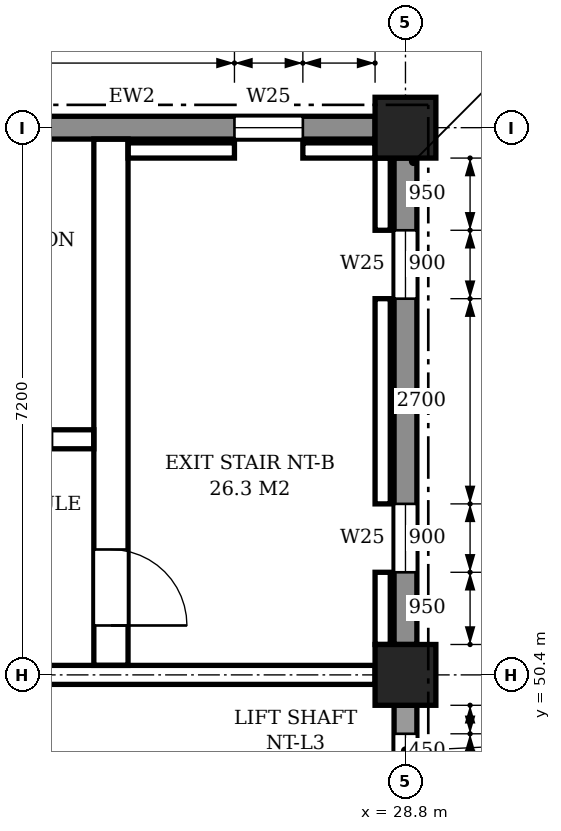
"""IFC4 building model, lengths in metres.
Left out: names, types, materials, properties, quantities, classifications, styles, units other than length and angle.
Written with IfcOpenShell. Run it as: python <this file> out.ifc"""

import sys

from ifc_helpers import new_model, si_unit, direction, frame, frame_2d, origin, origin_2d, place, context, subcontext, project, spatial, polyline, rectangle, outline, extrude, element, fill, save


model = new_model("IFC4")
c1 = context("Model", 3, precision=1e-05, world=origin(), true_north=direction((0.0, 1.0)))
c2 = subcontext(c1, "Body", "Model", "MODEL_VIEW")
j1 = project(units=[si_unit("LENGTHUNIT", "METRE"), si_unit("PLANEANGLEUNIT", "RADIAN")], contexts=[c1])
p1 = place(None, origin())
s1 = spatial("IfcSite", under=j1, at=p1, CompositionType="ELEMENT")
p2 = place(p1, origin())
s2 = spatial("IfcBuilding", under=s1, at=p2, CompositionType="ELEMENT")
p3 = place(p2, frame((0.0, 0.0, 49.8)))
s3 = spatial("IfcBuildingStorey", under=s2, at=p3, CompositionType="ELEMENT", Elevation=49.8)
for number, where, z_axis, x_axis in (
    (1, (28.8, 50.4, 0.0), (0.0, 0.0, 1.0), (1.0, 0.0, 0.0)),
    (2, (28.8, 57.6, 0.0), (0.0, 0.0, 1.0), (1.0, 0.0, 0.0)),
):
    element("IfcColumn", number, at=place(p3, frame(where, z_axis=z_axis, x_axis=x_axis)), inside=s3, PredefinedType="COLUMN", context=c2, shape_type="SweptSolid", body=[
        extrude(rectangle(XDim=0.8, YDim=0.8, at=origin_2d()), origin(), (0.0, 0.0, 1.0), 4.5),
    ])
p4 = place(p3, frame((28.4, 57.6, 0.0), z_axis=(0.0, 0.0, 1.0), x_axis=(-1.0, 0.0, 0.0)))
e3 = element("IfcWall", 3, at=p4, inside=s3, PredefinedType="STANDARD", context=c2, shape_type="SweptSolid", body=[
    extrude(rectangle(XDim=6.4, YDim=0.3, at=frame_2d((3.2, 0.0))), origin(), (0.0, 0.0, 1.0), 3.6),
])
p5 = place(p4, frame((0.95, 0.0, 0.9)))
e4 = element("IfcOpeningElement", 4, at=p5, cuts=e3, PredefinedType="OPENING", context=c2, shape_type="SweptSolid", body=[
    extrude(outline(polyline([(0.0, 0.0), (0.9, 0.0), (0.9, 2.15), (0.45, 2.6), (0.0, 2.15), (0.0, 0.0)])), frame((0.0, 0.16, 0.0), z_axis=(0.0, -1.0, 0.0), x_axis=(1.0, 0.0, 0.0)), (0.0, 0.0, 1.0), 0.32),
])
p6 = place(p3, frame((28.8, 43.6, 0.0), z_axis=(0.0, 0.0, 1.0), x_axis=(0.0, 1.0, 0.0)))
e5 = element("IfcWall", 5, at=p6, inside=s3, PredefinedType="STANDARD", context=c2, shape_type="SweptSolid", body=[
    extrude(rectangle(XDim=6.4, YDim=0.3, at=frame_2d((3.2, 0.0))), origin(), (0.0, 0.0, 1.0), 3.6),
])
p7 = place(p6, frame((3.975, 0.0, 0.9)))
e6 = element("IfcOpeningElement", 6, at=p7, cuts=e5, PredefinedType="OPENING", context=c2, shape_type="SweptSolid", body=[
    extrude(outline(polyline([(0.0, 0.0), (0.45, 0.0), (0.45, 2.35), (0.225, 2.6), (0.0, 2.35), (0.0, 0.0)])), frame((0.0, 0.16, 0.0), z_axis=(0.0, -1.0, 0.0), x_axis=(1.0, 0.0, 0.0)), (0.0, 0.0, 1.0), 0.32),
])
p8 = place(p6, frame((4.775, 0.0, 0.9)))
e7 = element("IfcOpeningElement", 7, at=p8, cuts=e5, PredefinedType="OPENING", context=c2, shape_type="SweptSolid", body=[
    extrude(outline(polyline([(0.0, 0.0), (0.45, 0.0), (0.45, 2.35), (0.225, 2.6), (0.0, 2.35), (0.0, 0.0)])), frame((0.0, 0.16, 0.0), z_axis=(0.0, -1.0, 0.0), x_axis=(1.0, 0.0, 0.0)), (0.0, 0.0, 1.0), 0.32),
])
p9 = place(p6, frame((5.575, 0.0, 0.9)))
e8 = element("IfcOpeningElement", 8, at=p9, cuts=e5, PredefinedType="OPENING", context=c2, shape_type="SweptSolid", body=[
    extrude(outline(polyline([(0.0, 0.0), (0.45, 0.0), (0.45, 2.35), (0.225, 2.6), (0.0, 2.35), (0.0, 0.0)])), frame((0.0, 0.16, 0.0), z_axis=(0.0, -1.0, 0.0), x_axis=(1.0, 0.0, 0.0)), (0.0, 0.0, 1.0), 0.32),
])
p10 = place(p3, frame((28.8, 50.8, 0.0), z_axis=(0.0, 0.0, 1.0), x_axis=(0.0, 1.0, 0.0)))
e9 = element("IfcWall", 9, at=p10, inside=s3, PredefinedType="STANDARD", context=c2, shape_type="SweptSolid", body=[
    extrude(rectangle(XDim=6.4, YDim=0.3, at=frame_2d((3.2, 0.0))), origin(), (0.0, 0.0, 1.0), 3.6),
])
p11 = place(p10, frame((0.95, 0.0, 0.9)))
e10 = element("IfcOpeningElement", 10, at=p11, cuts=e9, PredefinedType="OPENING", context=c2, shape_type="SweptSolid", body=[
    extrude(outline(polyline([(0.0, 0.0), (0.9, 0.0), (0.9, 2.15), (0.45, 2.6), (0.0, 2.15), (0.0, 0.0)])), frame((0.0, 0.16, 0.0), z_axis=(0.0, -1.0, 0.0), x_axis=(1.0, 0.0, 0.0)), (0.0, 0.0, 1.0), 0.32),
])
p12 = place(p10, frame((4.55, 0.0, 0.9)))
e11 = element("IfcOpeningElement", 11, at=p12, cuts=e9, PredefinedType="OPENING", context=c2, shape_type="SweptSolid", body=[
    extrude(outline(polyline([(0.0, 0.0), (0.9, 0.0), (0.9, 2.15), (0.45, 2.6), (0.0, 2.15), (0.0, 0.0)])), frame((0.0, 0.16, 0.0), z_axis=(0.0, -1.0, 0.0), x_axis=(1.0, 0.0, 0.0)), (0.0, 0.0, 1.0), 0.32),
])
p13 = place(p3, frame((22.0, 50.4, 0.0), z_axis=(0.0, 0.0, 1.0), x_axis=(1.0, 0.0, 0.0)))
e12 = element("IfcWall", 12, at=p13, inside=s3, PredefinedType="SHEAR", context=c2, shape_type="SweptSolid", body=[
    extrude(rectangle(XDim=6.4, YDim=0.25, at=frame_2d((3.2, 0.0))), origin(), (0.0, 0.0, 1.0), 3.55),
])
p14 = place(p13, frame((0.45, 0.0, 0.0)))
e13 = element("IfcOpeningElement", 13, at=p14, cuts=e12, PredefinedType="OPENING", context=c2, shape_type="SweptSolid", body=[
    extrude(rectangle(XDim=1.1, YDim=2.1, at=frame_2d((0.55, 1.05))), frame((0.0, 0.135, 0.0), z_axis=(0.0, -1.0, 0.0), x_axis=(1.0, 0.0, 0.0)), (0.0, 0.0, 1.0), 0.27),
])
p15 = place(p3, frame((28.5, 50.8, -0.25), z_axis=(0.0, 0.0, 1.0), x_axis=(0.0, 1.0, 0.0)))
e14 = element("IfcWall", 14, at=p15, inside=s3, PredefinedType="SHEAR", context=c2, shape_type="SweptSolid", body=[
    extrude(rectangle(XDim=0.95, YDim=0.2, at=frame_2d((0.475, 0.0))), origin(), (0.0, 0.0, 1.0), 4.45),
])
p16 = place(p3, frame((28.5, 52.65, -0.25), z_axis=(0.0, 0.0, 1.0), x_axis=(0.0, 1.0, 0.0)))
e15 = element("IfcWall", 15, at=p16, inside=s3, PredefinedType="SHEAR", context=c2, shape_type="SweptSolid", body=[
    extrude(rectangle(XDim=2.7, YDim=0.2, at=frame_2d((1.35, 0.0))), origin(), (0.0, 0.0, 1.0), 4.45),
])
p17 = place(p3, frame((28.5, 56.25, -0.25), z_axis=(0.0, 0.0, 1.0), x_axis=(0.0, 1.0, 0.0)))
e16 = element("IfcWall", 16, at=p17, inside=s3, PredefinedType="SHEAR", context=c2, shape_type="SweptSolid", body=[
    extrude(rectangle(XDim=0.95, YDim=0.2, at=frame_2d((0.475, 0.0))), origin(), (0.0, 0.0, 1.0), 4.45),
])
p18 = place(p3, frame((25.15, 57.3, -0.25), z_axis=(0.0, 0.0, 1.0), x_axis=(1.0, 0.0, 0.0)))
e17 = element("IfcWall", 17, at=p18, inside=s3, PredefinedType="SHEAR", context=c2, shape_type="SweptSolid", body=[
    extrude(rectangle(XDim=1.4, YDim=0.2, at=frame_2d((0.7, 0.0))), origin(), (0.0, 0.0, 1.0), 4.45),
])
p19 = place(p3, frame((27.45, 57.3, -0.25), z_axis=(0.0, 0.0, 1.0), x_axis=(1.0, 0.0, 0.0)))
e18 = element("IfcWall", 18, at=p19, inside=s3, PredefinedType="SHEAR", context=c2, shape_type="SweptSolid", body=[
    extrude(rectangle(XDim=0.95, YDim=0.2, at=frame_2d((0.475, 0.0))), origin(), (0.0, 0.0, 1.0), 4.45),
])
p20 = place(p3, frame((24.925, 50.525, 0.0), z_axis=(0.0, 0.0, 1.0), x_axis=(0.0, 1.0, 0.0)))
e19 = element("IfcWall", 19, at=p20, inside=s3, PredefinedType="SHEAR", context=c2, shape_type="SweptSolid", body=[
    extrude(rectangle(XDim=6.925, YDim=0.45, at=frame_2d((3.462, 0.0))), origin(), (0.0, 0.0, 1.0), 4.2),
])
p21 = place(p20, frame((0.525, 0.0, 0.0)))
e20 = element("IfcOpeningElement", 20, at=p21, cuts=e19, PredefinedType="OPENING", context=c2, shape_type="SweptSolid", body=[
    extrude(rectangle(XDim=1.0, YDim=2.1, at=frame_2d((0.5, 1.05))), frame((0.0, 0.235, 0.0), z_axis=(0.0, -1.0, 0.0), x_axis=(1.0, 0.0, 0.0)), (0.0, 0.0, 1.0), 0.47),
])
p22 = place(p3, frame((21.725, 53.5, 0.0), z_axis=(0.0, 0.0, 1.0), x_axis=(1.0, 0.0, 0.0)))
e21 = element("IfcWall", 21, at=p22, inside=s3, PredefinedType="SHEAR", context=c2, shape_type="SweptSolid", body=[
    extrude(rectangle(XDim=2.975, YDim=0.25, at=frame_2d((1.487, 0.0))), origin(), (0.0, 0.0, 1.0), 4.2),
])
p23 = place(p22, frame((1.525, 0.0, 0.0)))
e22 = element("IfcOpeningElement", 22, at=p23, cuts=e21, PredefinedType="OPENING", context=c2, shape_type="SweptSolid", body=[
    extrude(rectangle(XDim=0.9, YDim=2.1, at=frame_2d((0.45, 1.05))), frame((0.0, 0.135, 0.0), z_axis=(0.0, -1.0, 0.0), x_axis=(1.0, 0.0, 0.0)), (0.0, 0.0, 1.0), 0.27),
])
p24 = place(p9, origin())
e23 = element("IfcWindow", 23, at=p24, inside=s3, PartitioningType="SINGLE_PANEL", PredefinedType="WINDOW", context=c2, shape_type="SweptSolid", body=[
    extrude(outline(polyline([(0.0, 0.0), (0.45, 0.0), (0.45, 2.35), (0.225, 2.6), (0.0, 2.35), (0.0, 0.0)])), frame((0.0, 0.03, 0.0), z_axis=(0.0, -1.0, 0.0), x_axis=(1.0, 0.0, 0.0)), (0.0, 0.0, 1.0), 0.06),
])
fill(e8, e23)
p25 = place(p11, origin())
e24 = element("IfcWindow", 24, at=p25, inside=s3, PartitioningType="SINGLE_PANEL", PredefinedType="WINDOW", context=c2, shape_type="SweptSolid", body=[
    extrude(outline(polyline([(0.0, 0.0), (0.9, 0.0), (0.9, 2.15), (0.45, 2.6), (0.0, 2.15), (0.0, 0.0)])), frame((0.0, 0.03, 0.0), z_axis=(0.0, -1.0, 0.0), x_axis=(1.0, 0.0, 0.0)), (0.0, 0.0, 1.0), 0.06),
])
fill(e10, e24)
p26 = place(p12, origin())
e25 = element("IfcWindow", 25, at=p26, inside=s3, PartitioningType="SINGLE_PANEL", PredefinedType="WINDOW", context=c2, shape_type="SweptSolid", body=[
    extrude(outline(polyline([(0.0, 0.0), (0.9, 0.0), (0.9, 2.15), (0.45, 2.6), (0.0, 2.15), (0.0, 0.0)])), frame((0.0, 0.03, 0.0), z_axis=(0.0, -1.0, 0.0), x_axis=(1.0, 0.0, 0.0)), (0.0, 0.0, 1.0), 0.06),
])
fill(e11, e25)
p27 = place(p5, origin())
e26 = element("IfcWindow", 26, at=p27, inside=s3, PartitioningType="SINGLE_PANEL", PredefinedType="WINDOW", context=c2, shape_type="SweptSolid", body=[
    extrude(outline(polyline([(0.0, 0.0), (0.9, 0.0), (0.9, 2.15), (0.45, 2.6), (0.0, 2.15), (0.0, 0.0)])), frame((0.0, 0.03, 0.0), z_axis=(0.0, -1.0, 0.0), x_axis=(1.0, 0.0, 0.0)), (0.0, 0.0, 1.0), 0.06),
])
fill(e4, e26)
p28 = place(p21, frame((1.0, 0.0, 0.0), z_axis=(0.0, 0.0, 1.0), x_axis=(-1.0, 0.0, 0.0)))
e27 = element("IfcDoor", 27, at=p28, inside=s3, OperationType="SINGLE_SWING_RIGHT", PredefinedType="DOOR", context=c2, shape_type="SweptSolid", body=[
    extrude(rectangle(XDim=1.0, YDim=2.1, at=frame_2d((0.5, 1.05))), frame((0.0, 0.025, 0.0), z_axis=(0.0, -1.0, 0.0), x_axis=(1.0, 0.0, 0.0)), (0.0, 0.0, 1.0), 0.05),
])
fill(e20, e27)
save(model, sys.argv[1])
